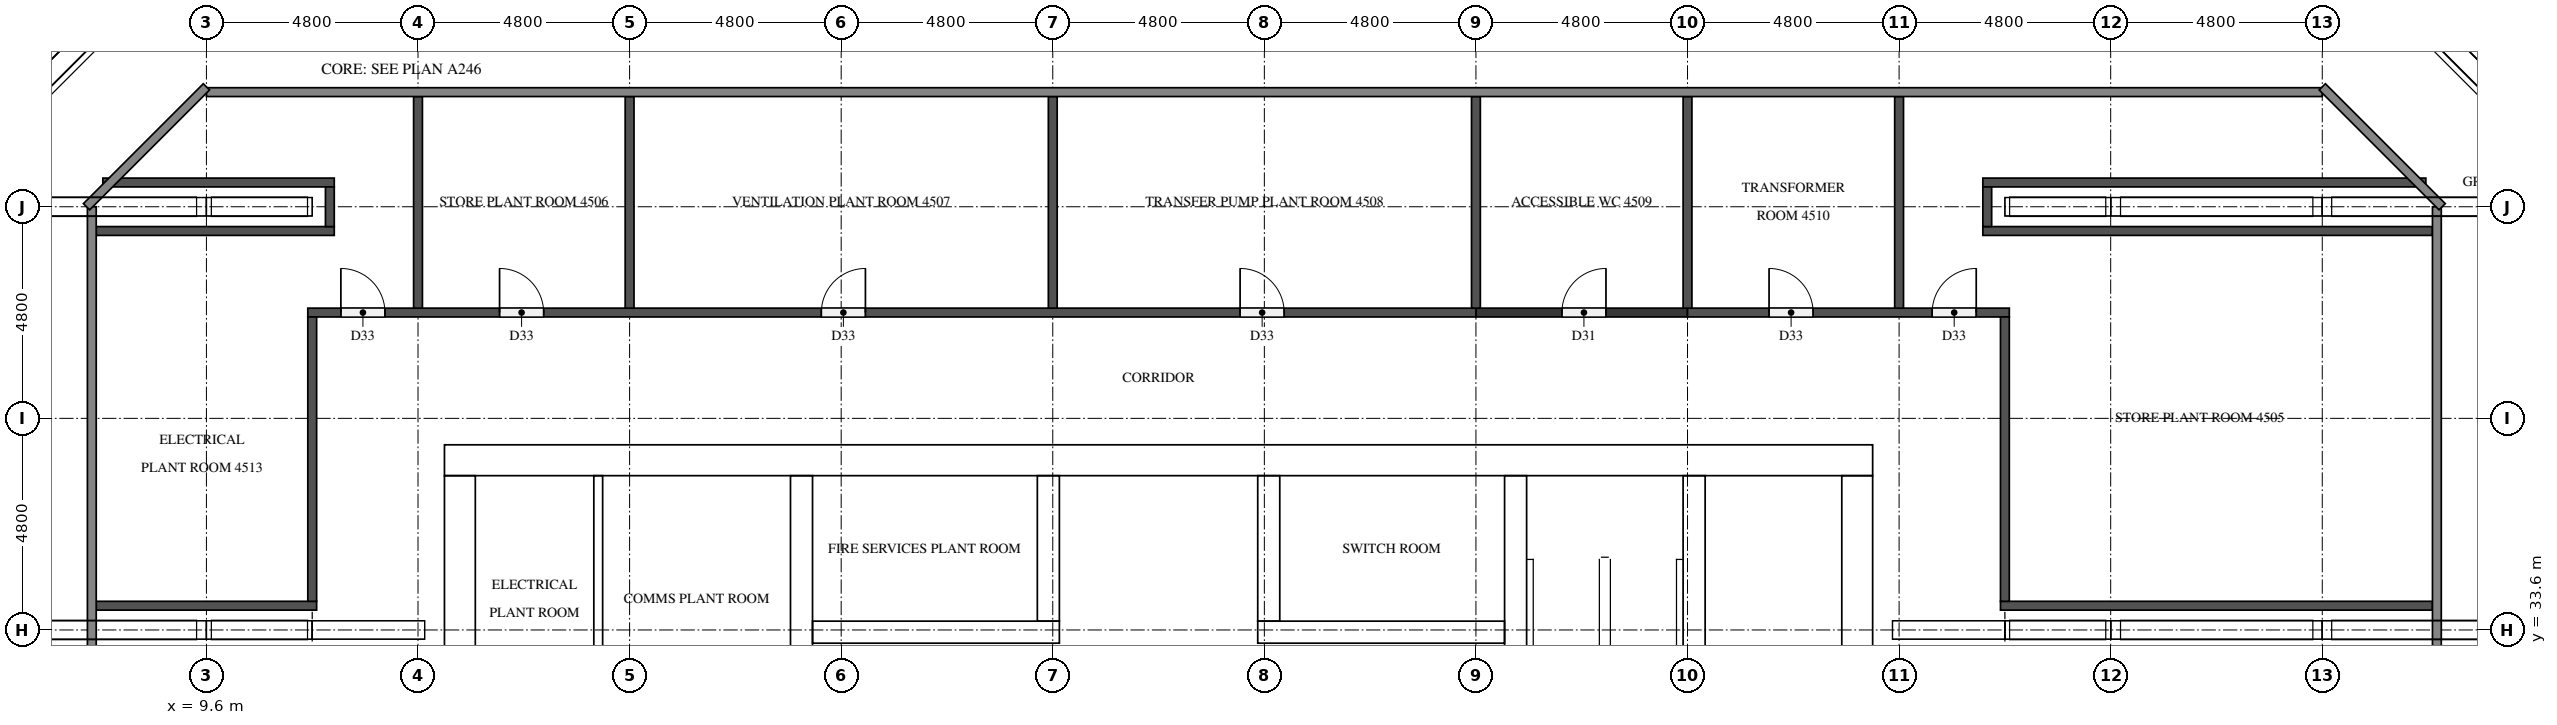
"""IFC4 building model, lengths in metres.
Left out: names, types, materials, properties, quantities, classifications, styles, units other than length and angle.
Written with IfcOpenShell. Run it as: python <this file> out.ifc"""

import sys

from ifc_helpers import new_model, si_unit, direction, frame, frame_2d, origin, place, context, subcontext, project, spatial, rectangle, extrude, element, fill, save


model = new_model("IFC4")
c1 = context("Model", 3, precision=1e-05, world=origin(), true_north=direction((0.0, 1.0)))
c2 = subcontext(c1, "Body", "Model", "MODEL_VIEW")
j1 = project(units=[si_unit("LENGTHUNIT", "METRE"), si_unit("PLANEANGLEUNIT", "RADIAN")], contexts=[c1])
p1 = place(None, origin())
s1 = spatial("IfcSite", under=j1, at=p1, CompositionType="ELEMENT")
p2 = place(p1, origin())
s2 = spatial("IfcBuilding", under=s1, at=p2, CompositionType="ELEMENT")
p3 = place(p2, frame((0.0, 0.0, 173.5)))
s3 = spatial("IfcBuildingStorey", under=s2, at=p3, CompositionType="ELEMENT", Elevation=173.5)
p4 = place(p3, frame((15.0, 37.45, 0.0), z_axis=(0.0, 0.0, 1.0), x_axis=(1.0, 0.0, 0.0)))
e1 = element("IfcWall", 1, at=p4, inside=s3, PredefinedType="SHEAR", context=c2, shape_type="SweptSolid", body=[
    extrude(rectangle(XDim=32.4, YDim=0.7, at=frame_2d((16.2, 0.0))), origin(), (0.0, 0.0, 1.0), 5.1),
])
p5 = place(p4, frame((15.3, 0.0, 0.0)))
e2 = element("IfcOpeningElement", 2, at=p5, cuts=e1, PredefinedType="OPENING", context=c2, shape_type="SweptSolid", body=[
    extrude(rectangle(XDim=1.8, YDim=2.1, at=frame_2d((0.9, 1.05))), frame((0.0, 0.36, 0.0), z_axis=(0.0, -1.0, 0.0), x_axis=(1.0, 0.0, 0.0)), (0.0, 0.0, 1.0), 0.72),
])
p6 = place(p4, frame((1.544, 0.0, 0.0)))
e3 = element("IfcOpeningElement", 3, at=p6, cuts=e1, PredefinedType="OPENING", context=c2, shape_type="SweptSolid", body=[
    extrude(rectangle(XDim=1.0, YDim=2.1, at=frame_2d((0.5, 1.05))), frame((0.0, 0.36, 0.0), z_axis=(0.0, -1.0, 0.0), x_axis=(1.0, 0.0, 0.0)), (0.0, 0.0, 1.0), 0.72),
])
p7 = place(p4, frame((5.219, 0.0, 0.0)))
e4 = element("IfcOpeningElement", 4, at=p7, cuts=e1, PredefinedType="OPENING", context=c2, shape_type="SweptSolid", body=[
    extrude(rectangle(XDim=1.0, YDim=2.1, at=frame_2d((0.5, 1.05))), frame((0.0, 0.36, 0.0), z_axis=(0.0, -1.0, 0.0), x_axis=(1.0, 0.0, 0.0)), (0.0, 0.0, 1.0), 0.72),
])
p8 = place(p3, frame((15.35, 15.7, 0.0), z_axis=(0.0, 0.0, 1.0), x_axis=(0.0, 1.0, 0.0)))
e5 = element("IfcWall", 5, at=p8, inside=s3, PredefinedType="SHEAR", context=c2, shape_type="SweptSolid", body=[
    extrude(rectangle(XDim=21.4, YDim=0.7, at=frame_2d((10.7, 0.0))), origin(), (0.0, 0.0, 1.0), 5.1),
])
p9 = place(p8, frame((5.06, 0.0, 0.0)))
e6 = element("IfcOpeningElement", 6, at=p9, cuts=e5, PredefinedType="OPENING", context=c2, shape_type="SweptSolid", body=[
    extrude(rectangle(XDim=1.2, YDim=2.1, at=frame_2d((0.6, 1.05))), frame((0.0, 0.36, 0.0), z_axis=(0.0, -1.0, 0.0), x_axis=(1.0, 0.0, 0.0)), (0.0, 0.0, 1.0), 0.72),
])
p10 = place(p3, frame((47.05, 15.7, 0.0), z_axis=(0.0, 0.0, 1.0), x_axis=(0.0, 1.0, 0.0)))
e7 = element("IfcWall", 7, at=p10, inside=s3, PredefinedType="SHEAR", context=c2, shape_type="SweptSolid", body=[
    extrude(rectangle(XDim=21.4, YDim=0.7, at=frame_2d((10.7, 0.0))), origin(), (0.0, 0.0, 1.0), 5.1),
])
p11 = place(p10, frame((10.4, 0.0, 0.0)))
e8 = element("IfcOpeningElement", 8, at=p11, cuts=e7, PredefinedType="OPENING", context=c2, shape_type="SweptSolid", body=[
    extrude(rectangle(XDim=1.2, YDim=2.1, at=frame_2d((0.6, 1.05))), frame((0.0, 0.36, 0.0), z_axis=(0.0, -1.0, 0.0), x_axis=(1.0, 0.0, 0.0)), (0.0, 0.0, 1.0), 0.72),
])
p12 = place(p3, frame((23.1, 15.7, 0.0), z_axis=(0.0, 0.0, 1.0), x_axis=(0.0, 1.0, 0.0)))
e9 = element("IfcWall", 9, at=p12, inside=s3, PredefinedType="SHEAR", context=c2, shape_type="SweptSolid", body=[
    extrude(rectangle(XDim=21.4, YDim=0.5, at=frame_2d((10.7, 0.0))), origin(), (0.0, 0.0, 1.0), 5.1),
])
p13 = place(p3, frame((39.3, 27.75, 0.0), z_axis=(0.0, 0.0, 1.0), x_axis=(0.0, 1.0, 0.0)))
e10 = element("IfcWall", 10, at=p13, inside=s3, PredefinedType="SHEAR", context=c2, shape_type="SweptSolid", body=[
    extrude(rectangle(XDim=9.35, YDim=0.5, at=frame_2d((4.675, 0.0))), origin(), (0.0, 0.0, 1.0), 5.1),
])
p14 = place(p3, frame((43.35, 27.75, 0.0), z_axis=(0.0, 0.0, 1.0), x_axis=(0.0, 1.0, 0.0)))
e11 = element("IfcWall", 11, at=p14, inside=s3, PredefinedType="SHEAR", context=c2, shape_type="SweptSolid", body=[
    extrude(rectangle(XDim=9.35, YDim=0.5, at=frame_2d((4.675, 0.0))), origin(), (0.0, 0.0, 1.0), 5.1),
])
p15 = place(p14, frame((7.65, 0.0, 0.0)))
e12 = element("IfcOpeningElement", 12, at=p15, cuts=e11, PredefinedType="OPENING", context=c2, shape_type="SweptSolid", body=[
    extrude(rectangle(XDim=1.2, YDim=2.1, at=frame_2d((0.6, 1.05))), frame((0.0, 0.26, 0.0), z_axis=(0.0, -1.0, 0.0), x_axis=(1.0, 0.0, 0.0)), (0.0, 0.0, 1.0), 0.52),
])
p16 = place(p3, frame((23.35, 33.55, 0.0), z_axis=(0.0, 0.0, 1.0), x_axis=(1.0, 0.0, 0.0)))
e13 = element("IfcWall", 13, at=p16, inside=s3, PredefinedType="SHEAR", context=c2, shape_type="SweptSolid", body=[
    extrude(rectangle(XDim=5.6, YDim=0.5, at=frame_2d((2.8, 0.0))), origin(), (0.0, 0.0, 1.0), 5.1),
])
p17 = place(p16, frame((2.05, 0.0, 0.0)))
e14 = element("IfcOpeningElement", 14, at=p17, cuts=e13, PredefinedType="OPENING", context=c2, shape_type="SweptSolid", body=[
    extrude(rectangle(XDim=1.0, YDim=2.1, at=frame_2d((0.5, 1.05))), frame((0.0, 0.26, 0.0), z_axis=(0.0, -1.0, 0.0), x_axis=(1.0, 0.0, 0.0)), (0.0, 0.0, 1.0), 0.52),
])
p18 = place(p3, frame((33.45, 33.55, 0.0), z_axis=(0.0, 0.0, 1.0), x_axis=(1.0, 0.0, 0.0)))
e15 = element("IfcWall", 15, at=p18, inside=s3, PredefinedType="SHEAR", context=c2, shape_type="SweptSolid", body=[
    extrude(rectangle(XDim=5.6, YDim=0.5, at=frame_2d((2.8, 0.0))), origin(), (0.0, 0.0, 1.0), 5.1),
])
p19 = place(p18, frame((2.55, 0.0, 0.0)))
e16 = element("IfcOpeningElement", 16, at=p19, cuts=e15, PredefinedType="OPENING", context=c2, shape_type="SweptSolid", body=[
    extrude(rectangle(XDim=1.0, YDim=2.1, at=frame_2d((0.5, 1.05))), frame((0.0, 0.26, 0.0), z_axis=(0.0, -1.0, 0.0), x_axis=(1.0, 0.0, 0.0)), (0.0, 0.0, 1.0), 0.52),
])
for number, where, z_axis, x_axis in (
    (17, (28.7, 33.8, 0.0), (0.0, 0.0, 1.0), (0.0, 1.0, 0.0)),
    (18, (33.7, 33.8, 0.0), (0.0, 0.0, 1.0), (0.0, 1.0, 0.0)),
):
    element("IfcWall", number, at=place(p3, frame(where, z_axis=z_axis, x_axis=x_axis)), inside=s3, PredefinedType="SHEAR", context=c2, shape_type="SweptSolid", body=[
        extrude(rectangle(XDim=3.3, YDim=0.5, at=frame_2d((1.65, 0.0))), origin(), (0.0, 0.0, 1.0), 5.1),
    ])
p20 = place(p3, frame((18.489, 31.5, 0.0), z_axis=(0.0, 0.0, 1.0), x_axis=(0.0, 1.0, 0.0)))
e19 = element("IfcWall", 19, at=p20, inside=s3, PredefinedType="PARTITIONING", context=c2, shape_type="SweptSolid", body=[
    extrude(rectangle(XDim=5.6, YDim=0.2, at=frame_2d((2.8, 0.0))), origin(), (0.0, 0.0, 1.0), 5.1),
])
p21 = place(p3, frame((7.1, 34.15, 0.0), z_axis=(0.0, 0.0, 1.0), x_axis=(1.0, 0.0, 0.0)))
e20 = element("IfcWall", 20, at=p21, inside=s3, PredefinedType="PARTITIONING", context=c2, shape_type="SweptSolid", body=[
    extrude(rectangle(XDim=5.0, YDim=0.2, at=frame_2d((2.5, 0.0))), origin(), (0.0, 0.0, 1.0), 5.1),
])
p22 = place(p3, frame((50.3, 34.15, 0.0), z_axis=(0.0, 0.0, 1.0), x_axis=(1.0, 0.0, 0.0)))
e21 = element("IfcWall", 21, at=p22, inside=s3, PredefinedType="PARTITIONING", context=c2, shape_type="SweptSolid", body=[
    extrude(rectangle(XDim=9.8, YDim=0.2, at=frame_2d((4.9, 0.0))), origin(), (0.0, 0.0, 1.0), 5.1),
])
p23 = place(p3, frame((38.4, 40.8, 0.0), z_axis=(0.0, 0.0, 1.0), x_axis=(1.0, 0.0, 0.0)))
e22 = element("IfcWall", 22, at=p23, inside=s3, PredefinedType="PARTITIONING", context=c2, shape_type="SweptSolid", body=[
    extrude(rectangle(XDim=4.8, YDim=0.2, at=frame_2d((2.4, 0.0))), origin(), (0.0, 0.0, 1.0), 5.1),
])
p24 = place(p23, frame((1.95, 0.0, 0.0)))
e23 = element("IfcOpeningElement", 23, at=p24, cuts=e22, PredefinedType="OPENING", context=c2, shape_type="SweptSolid", body=[
    extrude(rectangle(XDim=1.0, YDim=2.1, at=frame_2d((0.5, 1.05))), frame((0.0, 0.11, 0.0), z_axis=(0.0, -1.0, 0.0), x_axis=(1.0, 0.0, 0.0)), (0.0, 0.0, 1.0), 0.22),
])
p25 = place(p3, frame((11.9, 40.8, 0.0), z_axis=(0.0, 0.0, 1.0), x_axis=(1.0, 0.0, 0.0)))
e24 = element("IfcWall", 24, at=p25, inside=s3, PredefinedType="PARTITIONING", context=c2, shape_type="SweptSolid", body=[
    extrude(rectangle(XDim=26.5, YDim=0.2, at=frame_2d((13.25, 0.0))), origin(), (0.0, 0.0, 1.0), 5.1),
])
p26 = place(p25, frame((4.35, 0.0, 0.0)))
e25 = element("IfcOpeningElement", 25, at=p26, cuts=e24, PredefinedType="OPENING", context=c2, shape_type="SweptSolid", body=[
    extrude(rectangle(XDim=1.0, YDim=2.1, at=frame_2d((0.5, 1.05))), frame((0.0, 0.11, 0.0), z_axis=(0.0, -1.0, 0.0), x_axis=(1.0, 0.0, 0.0)), (0.0, 0.0, 1.0), 0.22),
])
p27 = place(p25, frame((11.65, 0.0, 0.0)))
e26 = element("IfcOpeningElement", 26, at=p27, cuts=e24, PredefinedType="OPENING", context=c2, shape_type="SweptSolid", body=[
    extrude(rectangle(XDim=1.0, YDim=2.1, at=frame_2d((0.5, 1.05))), frame((0.0, 0.11, 0.0), z_axis=(0.0, -1.0, 0.0), x_axis=(1.0, 0.0, 0.0)), (0.0, 0.0, 1.0), 0.22),
])
p28 = place(p25, frame((21.15, 0.0, 0.0)))
e27 = element("IfcOpeningElement", 27, at=p28, cuts=e24, PredefinedType="OPENING", context=c2, shape_type="SweptSolid", body=[
    extrude(rectangle(XDim=1.0, YDim=2.1, at=frame_2d((0.5, 1.05))), frame((0.0, 0.11, 0.0), z_axis=(0.0, -1.0, 0.0), x_axis=(1.0, 0.0, 0.0)), (0.0, 0.0, 1.0), 0.22),
])
p29 = place(p25, frame((0.75, 0.0, 0.0)))
e28 = element("IfcOpeningElement", 28, at=p29, cuts=e24, PredefinedType="OPENING", context=c2, shape_type="SweptSolid", body=[
    extrude(rectangle(XDim=1.0, YDim=2.1, at=frame_2d((0.5, 1.05))), frame((0.0, 0.11, 0.0), z_axis=(0.0, -1.0, 0.0), x_axis=(1.0, 0.0, 0.0)), (0.0, 0.0, 1.0), 0.22),
])
p30 = place(p3, frame((43.2, 40.8, 0.0), z_axis=(0.0, 0.0, 1.0), x_axis=(1.0, 0.0, 0.0)))
e29 = element("IfcWall", 29, at=p30, inside=s3, PredefinedType="PARTITIONING", context=c2, shape_type="SweptSolid", body=[
    extrude(rectangle(XDim=7.3, YDim=0.2, at=frame_2d((3.65, 0.0))), origin(), (0.0, 0.0, 1.0), 5.1),
])
p31 = place(p30, frame((5.55, 0.0, 0.0)))
e30 = element("IfcOpeningElement", 30, at=p31, cuts=e29, PredefinedType="OPENING", context=c2, shape_type="SweptSolid", body=[
    extrude(rectangle(XDim=1.0, YDim=2.1, at=frame_2d((0.5, 1.05))), frame((0.0, 0.11, 0.0), z_axis=(0.0, -1.0, 0.0), x_axis=(1.0, 0.0, 0.0)), (0.0, 0.0, 1.0), 0.22),
])
p32 = place(p30, frame((1.85, 0.0, 0.0)))
e31 = element("IfcOpeningElement", 31, at=p32, cuts=e29, PredefinedType="OPENING", context=c2, shape_type="SweptSolid", body=[
    extrude(rectangle(XDim=1.0, YDim=2.1, at=frame_2d((0.5, 1.05))), frame((0.0, 0.11, 0.0), z_axis=(0.0, -1.0, 0.0), x_axis=(1.0, 0.0, 0.0)), (0.0, 0.0, 1.0), 0.22),
])
p33 = place(p3, frame((7.1, 42.65, 0.0), z_axis=(0.0, 0.0, 1.0), x_axis=(1.0, 0.0, 0.0)))
e32 = element("IfcWall", 32, at=p33, inside=s3, PredefinedType="PARTITIONING", context=c2, shape_type="SweptSolid", body=[
    extrude(rectangle(XDim=5.4, YDim=0.2, at=frame_2d((2.7, 0.0))), origin(), (0.0, 0.0, 1.0), 5.1),
])
p34 = place(p3, frame((49.9, 42.65, 0.0), z_axis=(0.0, 0.0, 1.0), x_axis=(1.0, 0.0, 0.0)))
e33 = element("IfcWall", 33, at=p34, inside=s3, PredefinedType="PARTITIONING", context=c2, shape_type="SweptSolid", body=[
    extrude(rectangle(XDim=10.2, YDim=0.2, at=frame_2d((5.1, 0.0))), origin(), (0.0, 0.0, 1.0), 5.1),
])
p35 = place(p3, frame((7.25, 43.75, 0.0), z_axis=(0.0, 0.0, 1.0), x_axis=(1.0, 0.0, 0.0)))
e34 = element("IfcWall", 34, at=p35, inside=s3, PredefinedType="PARTITIONING", context=c2, shape_type="SweptSolid", body=[
    extrude(rectangle(XDim=5.25, YDim=0.2, at=frame_2d((2.625, 0.0))), origin(), (0.0, 0.0, 1.0), 5.1),
])
p36 = place(p3, frame((49.9, 43.75, 0.0), z_axis=(0.0, 0.0, 1.0), x_axis=(1.0, 0.0, 0.0)))
e35 = element("IfcWall", 35, at=p36, inside=s3, PredefinedType="PARTITIONING", context=c2, shape_type="SweptSolid", body=[
    extrude(rectangle(XDim=10.05, YDim=0.2, at=frame_2d((5.025, 0.0))), origin(), (0.0, 0.0, 1.0), 5.1),
])
p37 = place(p3, frame((12.0, 34.25, 0.0), z_axis=(0.0, 0.0, 1.0), x_axis=(0.0, 1.0, 0.0)))
e36 = element("IfcWall", 36, at=p37, inside=s3, PredefinedType="PARTITIONING", context=c2, shape_type="SweptSolid", body=[
    extrude(rectangle(XDim=6.45, YDim=0.2, at=frame_2d((3.225, 0.0))), origin(), (0.0, 0.0, 1.0), 5.1),
])
p38 = place(p3, frame((12.4, 42.75, 0.0), z_axis=(0.0, 0.0, 1.0), x_axis=(0.0, 1.0, 0.0)))
e37 = element("IfcWall", 37, at=p38, inside=s3, PredefinedType="PARTITIONING", context=c2, shape_type="SweptSolid", body=[
    extrude(rectangle(XDim=0.9, YDim=0.2, at=frame_2d((0.45, 0.0))), origin(), (0.0, 0.0, 1.0), 5.1),
])
for number, where, z_axis, x_axis in (
    (38, (14.4, 40.9, 0.0), (0.0, 0.0, 1.0), (0.0, 1.0, 0.0)),
    (39, (19.2, 40.9, 0.0), (0.0, 0.0, 1.0), (0.0, 1.0, 0.0)),
    (40, (28.8, 40.9, 0.0), (0.0, 0.0, 1.0), (0.0, 1.0, 0.0)),
    (41, (38.4, 40.9, 0.0), (0.0, 0.0, 1.0), (0.0, 1.0, 0.0)),
    (42, (43.2, 40.9, 0.0), (0.0, 0.0, 1.0), (0.0, 1.0, 0.0)),
    (43, (48.0, 40.9, 0.0), (0.0, 0.0, 1.0), (0.0, 1.0, 0.0)),
):
    element("IfcWall", number, at=place(p3, frame(where, z_axis=z_axis, x_axis=x_axis)), inside=s3, PredefinedType="PARTITIONING", context=c2, shape_type="SweptSolid", body=[
        extrude(rectangle(XDim=4.8, YDim=0.2, at=frame_2d((2.4, 0.0))), origin(), (0.0, 0.0, 1.0), 5.1),
    ])
p39 = place(p3, frame((50.0, 42.75, 0.0), z_axis=(0.0, 0.0, 1.0), x_axis=(0.0, 1.0, 0.0)))
e44 = element("IfcWall", 44, at=p39, inside=s3, PredefinedType="PARTITIONING", context=c2, shape_type="SweptSolid", body=[
    extrude(rectangle(XDim=0.9, YDim=0.2, at=frame_2d((0.45, 0.0))), origin(), (0.0, 0.0, 1.0), 5.1),
])
p40 = place(p3, frame((50.4, 34.25, 0.0), z_axis=(0.0, 0.0, 1.0), x_axis=(0.0, 1.0, 0.0)))
e45 = element("IfcWall", 45, at=p40, inside=s3, PredefinedType="PARTITIONING", context=c2, shape_type="SweptSolid", body=[
    extrude(rectangle(XDim=6.45, YDim=0.2, at=frame_2d((3.225, 0.0))), origin(), (0.0, 0.0, 1.0), 5.1),
])
p41 = place(p15, origin())
e46 = element("IfcDoor", 46, at=p41, inside=s3, OperationType="SINGLE_SWING_LEFT", PredefinedType="DOOR", context=c2, shape_type="SweptSolid", body=[
    extrude(rectangle(XDim=1.2, YDim=2.1, at=frame_2d((0.6, 1.05))), frame((0.0, 0.025, 0.0), z_axis=(0.0, -1.0, 0.0), x_axis=(1.0, 0.0, 0.0)), (0.0, 0.0, 1.0), 0.05),
])
fill(e12, e46)
p42 = place(p5, origin())
e47 = element("IfcDoor", 47, at=p42, inside=s3, OperationType="DOUBLE_DOOR_SINGLE_SWING", PredefinedType="DOOR", context=c2, shape_type="SweptSolid", body=[
    extrude(rectangle(XDim=1.8, YDim=2.1, at=frame_2d((0.9, 1.05))), frame((0.0, 0.025, 0.0), z_axis=(0.0, -1.0, 0.0), x_axis=(1.0, 0.0, 0.0)), (0.0, 0.0, 1.0), 0.05),
])
fill(e2, e47)
p43 = place(p6, origin())
e48 = element("IfcDoor", 48, at=p43, inside=s3, OperationType="SINGLE_SWING_RIGHT", PredefinedType="DOOR", context=c2, shape_type="SweptSolid", body=[
    extrude(rectangle(XDim=1.0, YDim=2.1, at=frame_2d((0.5, 1.05))), frame((0.0, 0.025, 0.0), z_axis=(0.0, -1.0, 0.0), x_axis=(1.0, 0.0, 0.0)), (0.0, 0.0, 1.0), 0.05),
])
fill(e3, e48)
p44 = place(p7, origin())
e49 = element("IfcDoor", 49, at=p44, inside=s3, OperationType="SINGLE_SWING_LEFT", PredefinedType="DOOR", context=c2, shape_type="SweptSolid", body=[
    extrude(rectangle(XDim=1.0, YDim=2.1, at=frame_2d((0.5, 1.05))), frame((0.0, 0.025, 0.0), z_axis=(0.0, -1.0, 0.0), x_axis=(1.0, 0.0, 0.0)), (0.0, 0.0, 1.0), 0.05),
])
fill(e4, e49)
p45 = place(p17, frame((1.0, 0.0, 0.0), z_axis=(0.0, 0.0, 1.0), x_axis=(-1.0, 0.0, 0.0)))
e50 = element("IfcDoor", 50, at=p45, inside=s3, OperationType="SINGLE_SWING_RIGHT", PredefinedType="DOOR", context=c2, shape_type="SweptSolid", body=[
    extrude(rectangle(XDim=1.0, YDim=2.1, at=frame_2d((0.5, 1.05))), frame((0.0, 0.025, 0.0), z_axis=(0.0, -1.0, 0.0), x_axis=(1.0, 0.0, 0.0)), (0.0, 0.0, 1.0), 0.05),
])
fill(e14, e50)
p46 = place(p19, frame((1.0, 0.0, 0.0), z_axis=(0.0, 0.0, 1.0), x_axis=(-1.0, 0.0, 0.0)))
e51 = element("IfcDoor", 51, at=p46, inside=s3, OperationType="SINGLE_SWING_LEFT", PredefinedType="DOOR", context=c2, shape_type="SweptSolid", body=[
    extrude(rectangle(XDim=1.0, YDim=2.1, at=frame_2d((0.5, 1.05))), frame((0.0, 0.025, 0.0), z_axis=(0.0, -1.0, 0.0), x_axis=(1.0, 0.0, 0.0)), (0.0, 0.0, 1.0), 0.05),
])
fill(e16, e51)
p47 = place(p31, origin())
e52 = element("IfcDoor", 52, at=p47, inside=s3, OperationType="SINGLE_SWING_RIGHT", PredefinedType="DOOR", context=c2, shape_type="SweptSolid", body=[
    extrude(rectangle(XDim=1.0, YDim=2.1, at=frame_2d((0.5, 1.05))), frame((0.0, 0.025, 0.0), z_axis=(0.0, -1.0, 0.0), x_axis=(1.0, 0.0, 0.0)), (0.0, 0.0, 1.0), 0.05),
])
fill(e30, e52)
p48 = place(p26, origin())
e53 = element("IfcDoor", 53, at=p48, inside=s3, OperationType="SINGLE_SWING_LEFT", PredefinedType="DOOR", context=c2, shape_type="SweptSolid", body=[
    extrude(rectangle(XDim=1.0, YDim=2.1, at=frame_2d((0.5, 1.05))), frame((0.0, 0.025, 0.0), z_axis=(0.0, -1.0, 0.0), x_axis=(1.0, 0.0, 0.0)), (0.0, 0.0, 1.0), 0.05),
])
fill(e25, e53)
p49 = place(p27, origin())
e54 = element("IfcDoor", 54, at=p49, inside=s3, OperationType="SINGLE_SWING_RIGHT", PredefinedType="DOOR", context=c2, shape_type="SweptSolid", body=[
    extrude(rectangle(XDim=1.0, YDim=2.1, at=frame_2d((0.5, 1.05))), frame((0.0, 0.025, 0.0), z_axis=(0.0, -1.0, 0.0), x_axis=(1.0, 0.0, 0.0)), (0.0, 0.0, 1.0), 0.05),
])
fill(e26, e54)
p50 = place(p28, origin())
e55 = element("IfcDoor", 55, at=p50, inside=s3, OperationType="SINGLE_SWING_LEFT", PredefinedType="DOOR", context=c2, shape_type="SweptSolid", body=[
    extrude(rectangle(XDim=1.0, YDim=2.1, at=frame_2d((0.5, 1.05))), frame((0.0, 0.025, 0.0), z_axis=(0.0, -1.0, 0.0), x_axis=(1.0, 0.0, 0.0)), (0.0, 0.0, 1.0), 0.05),
])
fill(e27, e55)
p51 = place(p24, origin())
e56 = element("IfcDoor", 56, at=p51, inside=s3, OperationType="SINGLE_SWING_RIGHT", PredefinedType="DOOR", context=c2, shape_type="SweptSolid", body=[
    extrude(rectangle(XDim=1.0, YDim=2.1, at=frame_2d((0.5, 1.05))), frame((0.0, 0.025, 0.0), z_axis=(0.0, -1.0, 0.0), x_axis=(1.0, 0.0, 0.0)), (0.0, 0.0, 1.0), 0.05),
])
fill(e23, e56)
p52 = place(p32, origin())
e57 = element("IfcDoor", 57, at=p52, inside=s3, OperationType="SINGLE_SWING_LEFT", PredefinedType="DOOR", context=c2, shape_type="SweptSolid", body=[
    extrude(rectangle(XDim=1.0, YDim=2.1, at=frame_2d((0.5, 1.05))), frame((0.0, 0.025, 0.0), z_axis=(0.0, -1.0, 0.0), x_axis=(1.0, 0.0, 0.0)), (0.0, 0.0, 1.0), 0.05),
])
fill(e31, e57)
p53 = place(p29, origin())
e58 = element("IfcDoor", 58, at=p53, inside=s3, OperationType="SINGLE_SWING_LEFT", PredefinedType="DOOR", context=c2, shape_type="SweptSolid", body=[
    extrude(rectangle(XDim=1.0, YDim=2.1, at=frame_2d((0.5, 1.05))), frame((0.0, 0.025, 0.0), z_axis=(0.0, -1.0, 0.0), x_axis=(1.0, 0.0, 0.0)), (0.0, 0.0, 1.0), 0.05),
])
fill(e28, e58)
save(model, sys.argv[1])
